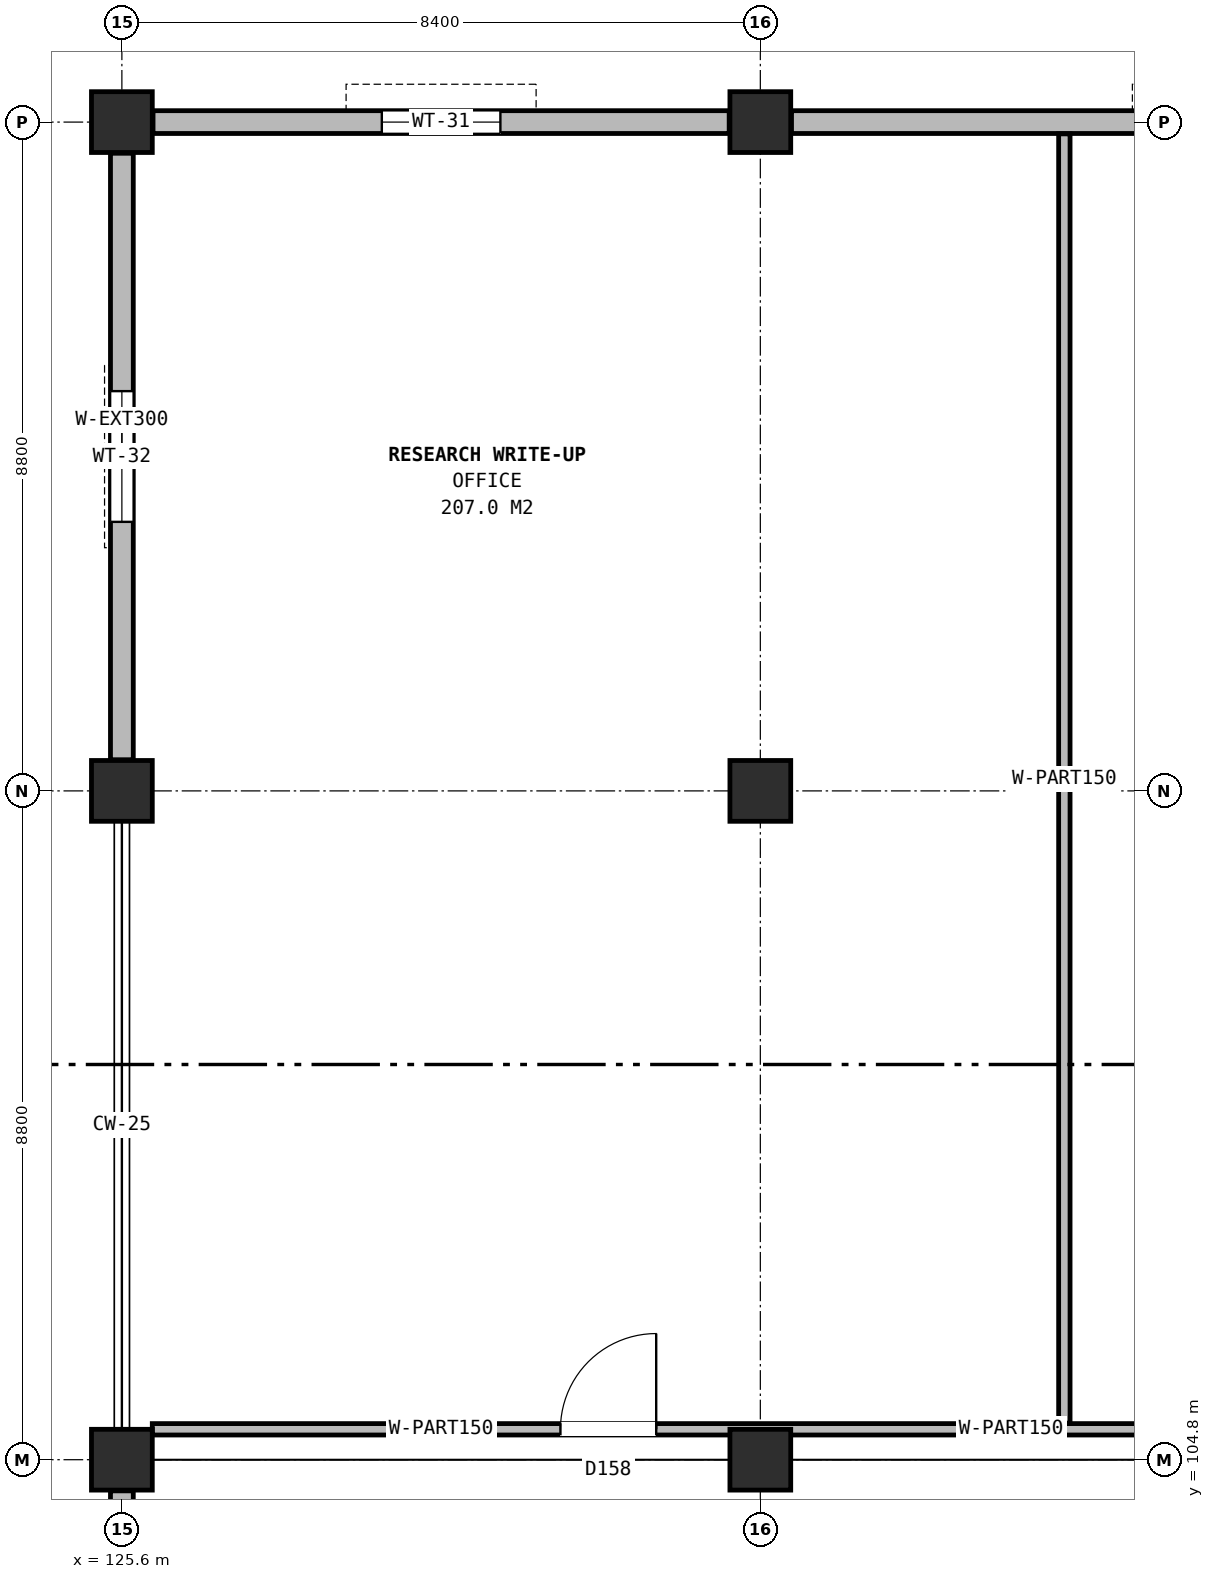
"""IFC4 building model, lengths in metres.
Left out: names, types, materials, properties, quantities, classifications, styles, units other than length and angle.
Written with IfcOpenShell. Run it as: python <this file> out.ifc"""

import sys

from ifc_helpers import new_model, si_unit, direction, frame, frame_2d, origin, origin_2d, place, context, subcontext, project, spatial, rectangle, extrude, element, fill, save


model = new_model("IFC4")
c1 = context("Model", 3, precision=1e-05, world=origin(), true_north=direction((0.0, 1.0)))
c2 = subcontext(c1, "Body", "Model", "MODEL_VIEW")
j1 = project(units=[si_unit("LENGTHUNIT", "METRE"), si_unit("PLANEANGLEUNIT", "RADIAN")], contexts=[c1])
p1 = place(None, origin())
s1 = spatial("IfcSite", under=j1, at=p1, CompositionType="ELEMENT")
p2 = place(p1, origin())
s2 = spatial("IfcBuilding", under=s1, at=p2, CompositionType="ELEMENT")
p3 = place(p2, frame((0.0, 0.0, 4.8)))
s3 = spatial("IfcBuildingStorey", under=s2, at=p3, CompositionType="ELEMENT", Elevation=4.8)
for number, where, z_axis, x_axis in (
    (1, (125.6, 104.8, 0.0), (0.0, 0.0, 1.0), (1.0, 0.0, 0.0)),
    (2, (125.6, 113.6, 0.0), (0.0, 0.0, 1.0), (1.0, 0.0, 0.0)),
    (3, (125.6, 122.4, 0.0), (0.0, 0.0, 1.0), (1.0, 0.0, 0.0)),
    (4, (134.0, 104.8, 0.0), (0.0, 0.0, 1.0), (1.0, 0.0, 0.0)),
    (5, (134.0, 113.6, 0.0), (0.0, 0.0, 1.0), (1.0, 0.0, 0.0)),
    (6, (134.0, 122.4, 0.0), (0.0, 0.0, 1.0), (1.0, 0.0, 0.0)),
):
    element("IfcColumn", number, at=place(p3, frame(where, z_axis=z_axis, x_axis=x_axis)), inside=s3, PredefinedType="COLUMN", context=c2, shape_type="SweptSolid", body=[
        extrude(rectangle(XDim=0.8, YDim=0.8, at=origin_2d()), origin(), (0.0, 0.0, 1.0), 4.2),
    ])
p4 = place(p3, frame((141.99, 122.4, 0.0), z_axis=(0.0, 0.0, 1.0), x_axis=(-1.0, 0.0, 0.0)))
e7 = element("IfcWall", 7, at=p4, inside=s3, PredefinedType="SOLIDWALL", context=c2, shape_type="SweptSolid", body=[
    extrude(rectangle(XDim=7.58, YDim=0.3, at=frame_2d((3.79, 0.0))), origin(), (0.0, 0.0, 1.0), 3.45),
])
p5 = place(p4, frame((1.285, 0.0, 0.9)))
e8 = element("IfcOpeningElement", 8, at=p5, cuts=e7, PredefinedType="OPENING", context=c2, shape_type="SweptSolid", body=[
    extrude(rectangle(XDim=1.42, YDim=1.86, at=frame_2d((0.71, 0.93))), frame((0.0, 0.16, 0.0), z_axis=(0.0, -1.0, 0.0), x_axis=(1.0, 0.0, 0.0)), (0.0, 0.0, 1.0), 0.32),
])
p6 = place(p3, frame((133.59, 122.4, 0.0), z_axis=(0.0, 0.0, 1.0), x_axis=(-1.0, 0.0, 0.0)))
e9 = element("IfcWall", 9, at=p6, inside=s3, PredefinedType="SOLIDWALL", context=c2, shape_type="SweptSolid", body=[
    extrude(rectangle(XDim=7.58, YDim=0.3, at=frame_2d((3.79, 0.0))), origin(), (0.0, 0.0, 1.0), 3.45),
])
p7 = place(p6, frame((3.01, 0.0, 0.9)))
e10 = element("IfcOpeningElement", 10, at=p7, cuts=e9, PredefinedType="OPENING", context=c2, shape_type="SweptSolid", body=[
    extrude(rectangle(XDim=1.56, YDim=1.88, at=frame_2d((0.78, 0.94))), frame((0.0, 0.16, 0.0), z_axis=(0.0, -1.0, 0.0), x_axis=(1.0, 0.0, 0.0)), (0.0, 0.0, 1.0), 0.32),
])
p8 = place(p3, frame((125.6, 121.99, 0.0), z_axis=(0.0, 0.0, 1.0), x_axis=(0.0, -1.0, 0.0)))
e11 = element("IfcWall", 11, at=p8, inside=s3, PredefinedType="SOLIDWALL", context=c2, shape_type="SweptSolid", body=[
    extrude(rectangle(XDim=7.98, YDim=0.3, at=frame_2d((3.99, 0.0))), origin(), (0.0, 0.0, 1.0), 3.45),
])
p9 = place(p8, frame((3.13, 0.0, 0.9)))
e12 = element("IfcOpeningElement", 12, at=p9, cuts=e11, PredefinedType="OPENING", context=c2, shape_type="SweptSolid", body=[
    extrude(rectangle(XDim=1.72, YDim=1.92, at=frame_2d((0.86, 0.96))), frame((0.0, 0.16, 0.0), z_axis=(0.0, -1.0, 0.0), x_axis=(1.0, 0.0, 0.0)), (0.0, 0.0, 1.0), 0.32),
])
p10 = place(p3, frame((125.6, 104.39, 0.0), z_axis=(0.0, 0.0, 1.0), x_axis=(0.0, -1.0, 0.0)))
e13 = element("IfcWall", 13, at=p10, inside=s3, PredefinedType="SOLIDWALL", context=c2, shape_type="SweptSolid", body=[
    extrude(rectangle(XDim=2.38, YDim=0.3, at=frame_2d((1.19, 0.0))), origin(), (0.0, 0.0, 1.0), 3.45),
])
p11 = place(p3, frame((126.0, 105.2, 0.0), z_axis=(0.0, 0.0, 1.0), x_axis=(1.0, 0.0, 0.0)))
e14 = element("IfcWall", 14, at=p11, inside=s3, PredefinedType="PARTITIONING", context=c2, shape_type="SweptSolid", body=[
    extrude(rectangle(XDim=12.0, YDim=0.15, at=frame_2d((6.0, 0.0))), origin(), (0.0, 0.0, 1.0), 3.445),
])
p12 = place(p11, frame((5.37, 0.0, 0.0)))
e15 = element("IfcOpeningElement", 15, at=p12, cuts=e14, PredefinedType="OPENING", context=c2, shape_type="SweptSolid", body=[
    extrude(rectangle(XDim=1.26, YDim=2.28, at=frame_2d((0.63, 1.14))), frame((0.0, 0.085, 0.0), z_axis=(0.0, -1.0, 0.0), x_axis=(1.0, 0.0, 0.0)), (0.0, 0.0, 1.0), 0.17),
])
p13 = place(p3, frame((138.0, 105.2, 0.0), z_axis=(0.0, 0.0, 1.0), x_axis=(1.0, 0.0, 0.0)))
e16 = element("IfcWall", 16, at=p13, inside=s3, PredefinedType="PARTITIONING", context=c2, shape_type="SweptSolid", body=[
    extrude(rectangle(XDim=10.6, YDim=0.15, at=frame_2d((5.3, 0.0))), origin(), (0.0, 0.0, 1.0), 3.445),
])
p14 = place(p13, frame((4.97, 0.0, 0.0)))
e17 = element("IfcOpeningElement", 17, at=p14, cuts=e16, PredefinedType="OPENING", context=c2, shape_type="SweptSolid", body=[
    extrude(rectangle(XDim=1.36, YDim=2.26, at=frame_2d((0.68, 1.13))), frame((0.0, 0.085, 0.0), z_axis=(0.0, -1.0, 0.0), x_axis=(1.0, 0.0, 0.0)), (0.0, 0.0, 1.0), 0.17),
])
p15 = place(p3, frame((138.0, 105.28, 0.0), z_axis=(0.0, 0.0, 1.0), x_axis=(0.0, 1.0, 0.0)))
e18 = element("IfcWall", 18, at=p15, inside=s3, PredefinedType="PARTITIONING", context=c2, shape_type="SweptSolid", body=[
    extrude(rectangle(XDim=16.965, YDim=0.15, at=frame_2d((8.482, 0.0))), origin(), (0.0, 0.0, 1.0), 3.865),
])
p16 = place(p7, origin())
e19 = element("IfcWindow", 19, at=p16, inside=s3, PartitioningType="SINGLE_PANEL", PredefinedType="WINDOW", context=c2, shape_type="SweptSolid", body=[
    extrude(rectangle(XDim=1.56, YDim=1.88, at=frame_2d((0.78, 0.94))), frame((0.0, 0.03, 0.0), z_axis=(0.0, -1.0, 0.0), x_axis=(1.0, 0.0, 0.0)), (0.0, 0.0, 1.0), 0.06),
])
fill(e10, e19)
p17 = place(p9, origin())
e20 = element("IfcWindow", 20, at=p17, inside=s3, PartitioningType="SINGLE_PANEL", PredefinedType="WINDOW", context=c2, shape_type="SweptSolid", body=[
    extrude(rectangle(XDim=1.72, YDim=1.92, at=frame_2d((0.86, 0.96))), frame((0.0, 0.03, 0.0), z_axis=(0.0, -1.0, 0.0), x_axis=(1.0, 0.0, 0.0)), (0.0, 0.0, 1.0), 0.06),
])
fill(e12, e20)
p18 = place(p12, origin())
e21 = element("IfcDoor", 21, at=p18, inside=s3, OperationType="SINGLE_SWING_RIGHT", PredefinedType="DOOR", context=c2, shape_type="SweptSolid", body=[
    extrude(rectangle(XDim=1.26, YDim=2.28, at=frame_2d((0.63, 1.14))), frame((0.0, 0.025, 0.0), z_axis=(0.0, -1.0, 0.0), x_axis=(1.0, 0.0, 0.0)), (0.0, 0.0, 1.0), 0.05),
])
fill(e15, e21)
save(model, sys.argv[1])
